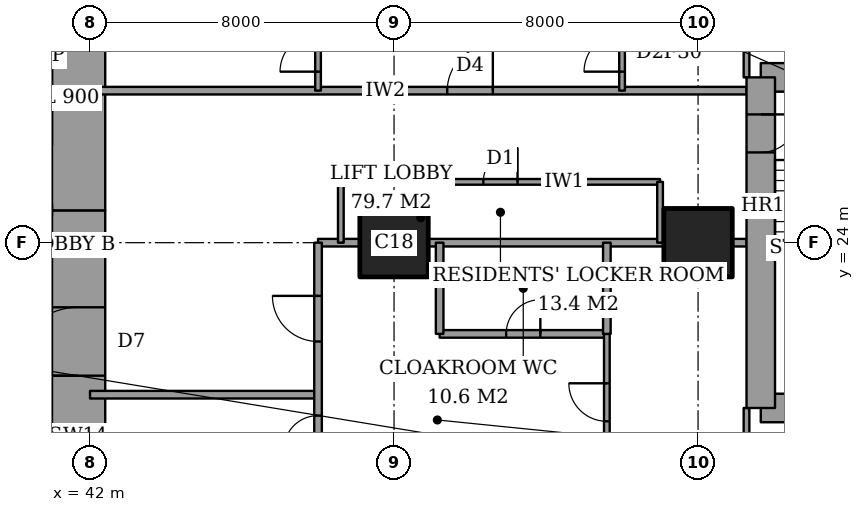
"""IFC4 building model, lengths in metres.
Left out: names, types, materials, properties, quantities, classifications, styles, units other than length and angle.
Written with IfcOpenShell. Run it as: python <this file> out.ifc"""

import sys

from ifc_helpers import new_model, si_unit, direction, frame, frame_2d, origin, origin_2d, place, context, subcontext, project, spatial, rectangle, extrude, element, fill, save


model = new_model("IFC4")
c1 = context("Model", 3, precision=1e-05, world=origin(), true_north=direction((0.0, 1.0)))
c2 = subcontext(c1, "Body", "Model", "MODEL_VIEW")
j1 = project(units=[si_unit("LENGTHUNIT", "METRE"), si_unit("PLANEANGLEUNIT", "RADIAN")], contexts=[c1])
p1 = place(None, origin())
s1 = spatial("IfcSite", under=j1, at=p1, CompositionType="ELEMENT")
p2 = place(p1, origin())
s2 = spatial("IfcBuilding", under=s1, at=p2, CompositionType="ELEMENT")
p3 = place(p2, frame((0.0, 0.0, 185.8)))
s3 = spatial("IfcBuildingStorey", under=s2, at=p3, CompositionType="ELEMENT", Elevation=185.8)
for number, where, z_axis, x_axis in (
    (1, (50.0, 24.0, 0.0), (0.0, 0.0, 1.0), (1.0, 0.0, 0.0)),
    (2, (58.0, 24.0, 0.0), (0.0, 0.0, 1.0), (1.0, 0.0, 0.0)),
):
    element("IfcColumn", number, at=place(p3, frame(where, z_axis=z_axis, x_axis=x_axis)), inside=s3, PredefinedType="COLUMN", context=c2, shape_type="SweptSolid", body=[
        extrude(rectangle(XDim=1.8, YDim=1.8, at=origin_2d()), origin(), (0.0, 0.0, 1.0), 3.6),
    ])
p4 = place(p3, frame((41.7, 13.0, 0.0), z_axis=(0.0, 0.0, 1.0), x_axis=(0.0, 1.0, 0.0)))
e3 = element("IfcWall", 3, at=p4, inside=s3, PredefinedType="SHEAR", context=c2, shape_type="SweptSolid", body=[
    extrude(rectangle(XDim=11.85, YDim=1.4, at=frame_2d((5.925, 0.0))), origin(), (0.0, 0.0, 1.0), 3.6),
])
p5 = place(p4, frame((7.5, 0.0, 0.0)))
e4 = element("IfcOpeningElement", 4, at=p5, cuts=e3, PredefinedType="OPENING", context=c2, shape_type="SweptSolid", body=[
    extrude(rectangle(XDim=1.8, YDim=2.4, at=frame_2d((0.9, 1.2))), frame((0.0, 0.71, 0.0), z_axis=(0.0, -1.0, 0.0), x_axis=(1.0, 0.0, 0.0)), (0.0, 0.0, 1.0), 1.42),
])
p6 = place(p3, frame((41.7, 24.85, 0.0), z_axis=(0.0, 0.0, 1.0), x_axis=(0.0, 1.0, 0.0)))
e5 = element("IfcWall", 5, at=p6, inside=s3, PredefinedType="SHEAR", context=c2, shape_type="SweptSolid", body=[
    extrude(rectangle(XDim=10.15, YDim=1.4, at=frame_2d((5.075, 0.0))), origin(), (0.0, 0.0, 1.0), 3.6),
])
for number, where, z_axis, x_axis in (
    (6, (59.65, 19.65, 0.0), (0.0, 0.0, 1.0), (1.0, 0.0, 0.0)),
    (7, (64.1, 28.35, 0.0), (0.0, 0.0, 1.0), (-1.0, 0.0, 0.0)),
):
    element("IfcWall", number, at=place(p3, frame(where, z_axis=z_axis, x_axis=x_axis)), inside=s3, PredefinedType="SHEAR", context=c2, shape_type="SweptSolid", body=[
        extrude(rectangle(XDim=4.45, YDim=0.75, at=frame_2d((2.225, 0.0))), origin(), (0.0, 0.0, 1.0), 3.6),
    ])
p7 = place(p3, frame((59.65, 28.35, 0.0), z_axis=(0.0, 0.0, 1.0), x_axis=(0.0, -1.0, 0.0)))
e8 = element("IfcWall", 8, at=p7, inside=s3, PredefinedType="SHEAR", context=c2, shape_type="SweptSolid", body=[
    extrude(rectangle(XDim=8.7, YDim=0.75, at=frame_2d((4.35, 0.0))), origin(), (0.0, 0.0, 1.0), 3.6),
])
p8 = place(p7, frame((0.975, 0.0, 0.0)))
e9 = element("IfcOpeningElement", 9, at=p8, cuts=e8, PredefinedType="OPENING", context=c2, shape_type="SweptSolid", body=[
    extrude(rectangle(XDim=1.0, YDim=2.1, at=frame_2d((0.5, 1.05))), frame((0.0, 0.385, 0.0), z_axis=(0.0, -1.0, 0.0), x_axis=(1.0, 0.0, 0.0)), (0.0, 0.0, 1.0), 0.77),
])
p9 = place(p3, frame((42.0, 20.0, 0.0), z_axis=(0.0, 0.0, 1.0), x_axis=(1.0, 0.0, 0.0)))
e10 = element("IfcWall", 10, at=p9, inside=s3, PredefinedType="PARTITIONING", context=c2, shape_type="SweptSolid", body=[
    extrude(rectangle(XDim=6.0, YDim=0.2, at=frame_2d((3.0, 0.0))), origin(), (0.0, 0.0, 1.0), 3.35),
])
p10 = place(p3, frame((51.2, 21.6, 0.0), z_axis=(0.0, 0.0, 1.0), x_axis=(1.0, 0.0, 0.0)))
e11 = element("IfcWall", 11, at=p10, inside=s3, PredefinedType="PARTITIONING", context=c2, shape_type="SweptSolid", body=[
    extrude(rectangle(XDim=4.4, YDim=0.2, at=frame_2d((2.2, 0.0))), origin(), (0.0, 0.0, 1.0), 3.35),
])
p11 = place(p10, frame((1.75, 0.0, 0.0)))
e12 = element("IfcOpeningElement", 12, at=p11, cuts=e11, PredefinedType="OPENING", context=c2, shape_type="SweptSolid", body=[
    extrude(rectangle(XDim=0.9, YDim=2.1, at=frame_2d((0.45, 1.05))), frame((0.0, 0.11, 0.0), z_axis=(0.0, -1.0, 0.0), x_axis=(1.0, 0.0, 0.0)), (0.0, 0.0, 1.0), 0.22),
])
p12 = place(p3, frame((48.0, 24.0, 0.0), z_axis=(0.0, 0.0, 1.0), x_axis=(1.0, 0.0, 0.0)))
e13 = element("IfcWall", 13, at=p12, inside=s3, PredefinedType="PARTITIONING", context=c2, shape_type="SweptSolid", body=[
    extrude(rectangle(XDim=1.1, YDim=0.2, at=frame_2d((0.55, 0.0))), origin(), (0.0, 0.0, 1.0), 3.35),
])
p13 = place(p3, frame((50.9, 24.0, 0.0), z_axis=(0.0, 0.0, 1.0), x_axis=(1.0, 0.0, 0.0)))
e14 = element("IfcWall", 14, at=p13, inside=s3, PredefinedType="PARTITIONING", context=c2, shape_type="SweptSolid", body=[
    extrude(rectangle(XDim=6.2, YDim=0.2, at=frame_2d((3.1, 0.0))), origin(), (0.0, 0.0, 1.0), 3.35),
])
p14 = place(p3, frame((58.9, 24.0, 0.0), z_axis=(0.0, 0.0, 1.0), x_axis=(1.0, 0.0, 0.0)))
e15 = element("IfcWall", 15, at=p14, inside=s3, PredefinedType="PARTITIONING", context=c2, shape_type="SweptSolid", body=[
    extrude(rectangle(XDim=0.375, YDim=0.2, at=frame_2d((0.188, 0.0))), origin(), (0.0, 0.0, 1.0), 3.35),
])
p15 = place(p3, frame((48.6, 25.6, 0.0), z_axis=(0.0, 0.0, 1.0), x_axis=(1.0, 0.0, 0.0)))
e16 = element("IfcWall", 16, at=p15, inside=s3, PredefinedType="PARTITIONING", context=c2, shape_type="SweptSolid", body=[
    extrude(rectangle(XDim=8.4, YDim=0.15, at=frame_2d((4.2, 0.0))), origin(), (0.0, 0.0, 1.0), 3.35),
])
p16 = place(p15, frame((3.75, 0.0, 0.0)))
e17 = element("IfcOpeningElement", 17, at=p16, cuts=e16, PredefinedType="OPENING", context=c2, shape_type="SweptSolid", body=[
    extrude(rectangle(XDim=0.9, YDim=2.1, at=frame_2d((0.45, 1.05))), frame((0.0, 0.085, 0.0), z_axis=(0.0, -1.0, 0.0), x_axis=(1.0, 0.0, 0.0)), (0.0, 0.0, 1.0), 0.17),
])
p17 = place(p3, frame((42.0, 28.0, 0.0), z_axis=(0.0, 0.0, 1.0), x_axis=(1.0, 0.0, 0.0)))
e18 = element("IfcWall", 18, at=p17, inside=s3, PredefinedType="PARTITIONING", context=c2, shape_type="SweptSolid", body=[
    extrude(rectangle(XDim=17.275, YDim=0.2, at=frame_2d((8.637, 0.0))), origin(), (0.0, 0.0, 1.0), 3.35),
])
p18 = place(p17, frame((9.4, 0.0, 0.0)))
e19 = element("IfcOpeningElement", 19, at=p18, cuts=e18, PredefinedType="OPENING", context=c2, shape_type="SweptSolid", body=[
    extrude(rectangle(XDim=1.2, YDim=2.4, at=frame_2d((0.6, 1.2))), frame((0.0, 0.11, 0.0), z_axis=(0.0, -1.0, 0.0), x_axis=(1.0, 0.0, 0.0)), (0.0, 0.0, 1.0), 0.22),
])
p19 = place(p3, frame((48.0, 18.0, 0.0), z_axis=(0.0, 0.0, 1.0), x_axis=(0.0, 1.0, 0.0)))
e20 = element("IfcWall", 20, at=p19, inside=s3, PredefinedType="PARTITIONING", context=c2, shape_type="SweptSolid", body=[
    extrude(rectangle(XDim=6.0, YDim=0.2, at=frame_2d((3.0, 0.0))), origin(), (0.0, 0.0, 1.0), 3.35),
])
p20 = place(p19, frame((3.4, 0.0, 0.0)))
e21 = element("IfcOpeningElement", 21, at=p20, cuts=e20, PredefinedType="OPENING", context=c2, shape_type="SweptSolid", body=[
    extrude(rectangle(XDim=1.2, YDim=2.4, at=frame_2d((0.6, 1.2))), frame((0.0, 0.11, 0.0), z_axis=(0.0, -1.0, 0.0), x_axis=(1.0, 0.0, 0.0)), (0.0, 0.0, 1.0), 0.22),
])
p21 = place(p19, frame((0.55, 0.0, 0.0)))
e22 = element("IfcOpeningElement", 22, at=p21, cuts=e20, PredefinedType="OPENING", context=c2, shape_type="SweptSolid", body=[
    extrude(rectangle(XDim=0.9, YDim=2.1, at=frame_2d((0.45, 1.05))), frame((0.0, 0.11, 0.0), z_axis=(0.0, -1.0, 0.0), x_axis=(1.0, 0.0, 0.0)), (0.0, 0.0, 1.0), 0.22),
])
p22 = place(p3, frame((48.0, 28.0, 0.0), z_axis=(0.0, 0.0, 1.0), x_axis=(0.0, 1.0, 0.0)))
e23 = element("IfcWall", 23, at=p22, inside=s3, PredefinedType="PARTITIONING", context=c2, shape_type="SweptSolid", body=[
    extrude(rectangle(XDim=9.4, YDim=0.15, at=frame_2d((4.7, 0.0))), origin(), (0.0, 0.0, 1.0), 3.35),
])
p23 = place(p22, frame((0.5, 0.0, 0.0)))
e24 = element("IfcOpeningElement", 24, at=p23, cuts=e23, PredefinedType="OPENING", context=c2, shape_type="SweptSolid", body=[
    extrude(rectangle(XDim=1.0, YDim=2.1, at=frame_2d((0.5, 1.05))), frame((0.0, 0.085, 0.0), z_axis=(0.0, -1.0, 0.0), x_axis=(1.0, 0.0, 0.0)), (0.0, 0.0, 1.0), 0.17),
])
p24 = place(p3, frame((48.6, 24.0, 0.0), z_axis=(0.0, 0.0, 1.0), x_axis=(0.0, 1.0, 0.0)))
e25 = element("IfcWall", 25, at=p24, inside=s3, PredefinedType="PARTITIONING", context=c2, shape_type="SweptSolid", body=[
    extrude(rectangle(XDim=1.6, YDim=0.15, at=frame_2d((0.8, 0.0))), origin(), (0.0, 0.0, 1.0), 3.35),
])
for number, where, z_axis, x_axis in (
    (26, (51.2, 21.6, 0.0), (0.0, 0.0, 1.0), (0.0, 1.0, 0.0)),
    (27, (55.6, 21.6, 0.0), (0.0, 0.0, 1.0), (0.0, 1.0, 0.0)),
):
    element("IfcWall", number, at=place(p3, frame(where, z_axis=z_axis, x_axis=x_axis)), inside=s3, PredefinedType="PARTITIONING", context=c2, shape_type="SweptSolid", body=[
        extrude(rectangle(XDim=2.4, YDim=0.2, at=frame_2d((1.2, 0.0))), origin(), (0.0, 0.0, 1.0), 3.35),
    ])
p25 = place(p3, frame((55.6, 14.6, 0.0), z_axis=(0.0, 0.0, 1.0), x_axis=(0.0, 1.0, 0.0)))
e28 = element("IfcWall", 28, at=p25, inside=s3, PredefinedType="PARTITIONING", context=c2, shape_type="SweptSolid", body=[
    extrude(rectangle(XDim=7.0, YDim=0.15, at=frame_2d((3.5, 0.0))), origin(), (0.0, 0.0, 1.0), 3.35),
])
p26 = place(p25, frame((4.7, 0.0, 0.0)))
e29 = element("IfcOpeningElement", 29, at=p26, cuts=e28, PredefinedType="OPENING", context=c2, shape_type="SweptSolid", body=[
    extrude(rectangle(XDim=1.0, YDim=2.1, at=frame_2d((0.5, 1.05))), frame((0.0, 0.085, 0.0), z_axis=(0.0, -1.0, 0.0), x_axis=(1.0, 0.0, 0.0)), (0.0, 0.0, 1.0), 0.17),
])
p27 = place(p3, frame((56.0, 28.0, 0.0), z_axis=(0.0, 0.0, 1.0), x_axis=(0.0, 1.0, 0.0)))
e30 = element("IfcWall", 30, at=p27, inside=s3, PredefinedType="PARTITIONING", context=c2, shape_type="SweptSolid", body=[
    extrude(rectangle(XDim=9.4, YDim=0.15, at=frame_2d((4.7, 0.0))), origin(), (0.0, 0.0, 1.0), 3.35),
])
p28 = place(p27, frame((0.5, 0.0, 0.0)))
e31 = element("IfcOpeningElement", 31, at=p28, cuts=e30, PredefinedType="OPENING", context=c2, shape_type="SweptSolid", body=[
    extrude(rectangle(XDim=1.0, YDim=2.1, at=frame_2d((0.5, 1.05))), frame((0.0, 0.085, 0.0), z_axis=(0.0, -1.0, 0.0), x_axis=(1.0, 0.0, 0.0)), (0.0, 0.0, 1.0), 0.17),
])
p29 = place(p3, frame((57.0, 24.0, 0.0), z_axis=(0.0, 0.0, 1.0), x_axis=(0.0, 1.0, 0.0)))
e32 = element("IfcWall", 32, at=p29, inside=s3, PredefinedType="PARTITIONING", context=c2, shape_type="SweptSolid", body=[
    extrude(rectangle(XDim=1.6, YDim=0.15, at=frame_2d((0.8, 0.0))), origin(), (0.0, 0.0, 1.0), 3.35),
])
p30 = place(p3, frame((59.275, 17.2, 0.0), z_axis=(0.0, 0.0, 1.0), x_axis=(0.0, 1.0, 0.0)))
e33 = element("IfcWall", 33, at=p30, inside=s3, PredefinedType="PARTITIONING", context=c2, shape_type="SweptSolid", body=[
    extrude(rectangle(XDim=2.45, YDim=0.15, at=frame_2d((1.225, 0.0))), origin(), (0.0, 0.0, 1.0), 3.35),
])
p31 = place(p30, frame((0.538, 0.0, 0.0)))
e34 = element("IfcOpeningElement", 34, at=p31, cuts=e33, PredefinedType="OPENING", context=c2, shape_type="SweptSolid", body=[
    extrude(rectangle(XDim=1.0, YDim=2.1, at=frame_2d((0.5, 1.05))), frame((0.0, 0.085, 0.0), z_axis=(0.0, -1.0, 0.0), x_axis=(1.0, 0.0, 0.0)), (0.0, 0.0, 1.0), 0.17),
])
p32 = place(p3, frame((59.275, 28.35, 0.0), z_axis=(0.0, 0.0, 1.0), x_axis=(0.0, 1.0, 0.0)))
e35 = element("IfcWall", 35, at=p32, inside=s3, PredefinedType="PARTITIONING", context=c2, shape_type="SweptSolid", body=[
    extrude(rectangle(XDim=2.45, YDim=0.15, at=frame_2d((1.225, 0.0))), origin(), (0.0, 0.0, 1.0), 3.35),
])
p33 = place(p32, frame((0.962, 0.0, 0.0)))
e36 = element("IfcOpeningElement", 36, at=p33, cuts=e35, PredefinedType="OPENING", context=c2, shape_type="SweptSolid", body=[
    extrude(rectangle(XDim=0.9, YDim=2.1, at=frame_2d((0.45, 1.05))), frame((0.0, 0.085, 0.0), z_axis=(0.0, -1.0, 0.0), x_axis=(1.0, 0.0, 0.0)), (0.0, 0.0, 1.0), 0.17),
])
p34 = place(p26, origin())
e37 = element("IfcDoor", 37, at=p34, inside=s3, OperationType="SINGLE_SWING_LEFT", PredefinedType="DOOR", context=c2, shape_type="SweptSolid", body=[
    extrude(rectangle(XDim=1.0, YDim=2.1, at=frame_2d((0.5, 1.05))), frame((0.0, 0.025, 0.0), z_axis=(0.0, -1.0, 0.0), x_axis=(1.0, 0.0, 0.0)), (0.0, 0.0, 1.0), 0.05),
])
fill(e29, e37)
p35 = place(p11, origin())
e38 = element("IfcDoor", 38, at=p35, inside=s3, OperationType="SINGLE_SWING_LEFT", PredefinedType="DOOR", context=c2, shape_type="SweptSolid", body=[
    extrude(rectangle(XDim=0.9, YDim=2.1, at=frame_2d((0.45, 1.05))), frame((0.0, 0.025, 0.0), z_axis=(0.0, -1.0, 0.0), x_axis=(1.0, 0.0, 0.0)), (0.0, 0.0, 1.0), 0.05),
])
fill(e12, e38)
p36 = place(p20, origin())
e39 = element("IfcDoor", 39, at=p36, inside=s3, OperationType="SINGLE_SWING_LEFT", PredefinedType="DOOR", context=c2, shape_type="SweptSolid", body=[
    extrude(rectangle(XDim=1.2, YDim=2.4, at=frame_2d((0.6, 1.2))), frame((0.0, 0.025, 0.0), z_axis=(0.0, -1.0, 0.0), x_axis=(1.0, 0.0, 0.0)), (0.0, 0.0, 1.0), 0.05),
])
fill(e21, e39)
p37 = place(p21, origin())
e40 = element("IfcDoor", 40, at=p37, inside=s3, OperationType="SINGLE_SWING_RIGHT", PredefinedType="DOOR", context=c2, shape_type="SweptSolid", body=[
    extrude(rectangle(XDim=0.9, YDim=2.1, at=frame_2d((0.45, 1.05))), frame((0.0, 0.025, 0.0), z_axis=(0.0, -1.0, 0.0), x_axis=(1.0, 0.0, 0.0)), (0.0, 0.0, 1.0), 0.05),
])
fill(e22, e40)
p38 = place(p28, origin())
e41 = element("IfcDoor", 41, at=p38, inside=s3, OperationType="SINGLE_SWING_RIGHT", PredefinedType="DOOR", context=c2, shape_type="SweptSolid", body=[
    extrude(rectangle(XDim=1.0, YDim=2.1, at=frame_2d((0.5, 1.05))), frame((0.0, 0.025, 0.0), z_axis=(0.0, -1.0, 0.0), x_axis=(1.0, 0.0, 0.0)), (0.0, 0.0, 1.0), 0.05),
])
fill(e31, e41)
p39 = place(p18, origin())
e42 = element("IfcDoor", 42, at=p39, inside=s3, OperationType="SINGLE_SWING_LEFT", PredefinedType="DOOR", context=c2, shape_type="SweptSolid", body=[
    extrude(rectangle(XDim=1.2, YDim=2.4, at=frame_2d((0.6, 1.2))), frame((0.0, 0.025, 0.0), z_axis=(0.0, -1.0, 0.0), x_axis=(1.0, 0.0, 0.0)), (0.0, 0.0, 1.0), 0.05),
])
fill(e19, e42)
p40 = place(p23, origin())
e43 = element("IfcDoor", 43, at=p40, inside=s3, OperationType="SINGLE_SWING_RIGHT", PredefinedType="DOOR", context=c2, shape_type="SweptSolid", body=[
    extrude(rectangle(XDim=1.0, YDim=2.1, at=frame_2d((0.5, 1.05))), frame((0.0, 0.025, 0.0), z_axis=(0.0, -1.0, 0.0), x_axis=(1.0, 0.0, 0.0)), (0.0, 0.0, 1.0), 0.05),
])
fill(e24, e43)
p41 = place(p16, origin())
e44 = element("IfcDoor", 44, at=p41, inside=s3, OperationType="SINGLE_SWING_LEFT", PredefinedType="DOOR", context=c2, shape_type="SweptSolid", body=[
    extrude(rectangle(XDim=0.9, YDim=2.1, at=frame_2d((0.45, 1.05))), frame((0.0, 0.025, 0.0), z_axis=(0.0, -1.0, 0.0), x_axis=(1.0, 0.0, 0.0)), (0.0, 0.0, 1.0), 0.05),
])
fill(e17, e44)
p42 = place(p5, origin())
e45 = element("IfcDoor", 45, at=p42, inside=s3, OperationType="DOUBLE_DOOR_DOUBLE_SWING", PredefinedType="DOOR", context=c2, shape_type="SweptSolid", body=[
    extrude(rectangle(XDim=1.8, YDim=2.4, at=frame_2d((0.9, 1.2))), frame((0.0, 0.025, 0.0), z_axis=(0.0, -1.0, 0.0), x_axis=(1.0, 0.0, 0.0)), (0.0, 0.0, 1.0), 0.05),
])
fill(e4, e45)
p43 = place(p8, origin())
e46 = element("IfcDoor", 46, at=p43, inside=s3, OperationType="SINGLE_SWING_RIGHT", PredefinedType="DOOR", context=c2, shape_type="SweptSolid", body=[
    extrude(rectangle(XDim=1.0, YDim=2.1, at=frame_2d((0.5, 1.05))), frame((0.0, 0.025, 0.0), z_axis=(0.0, -1.0, 0.0), x_axis=(1.0, 0.0, 0.0)), (0.0, 0.0, 1.0), 0.05),
])
fill(e9, e46)
save(model, sys.argv[1])
